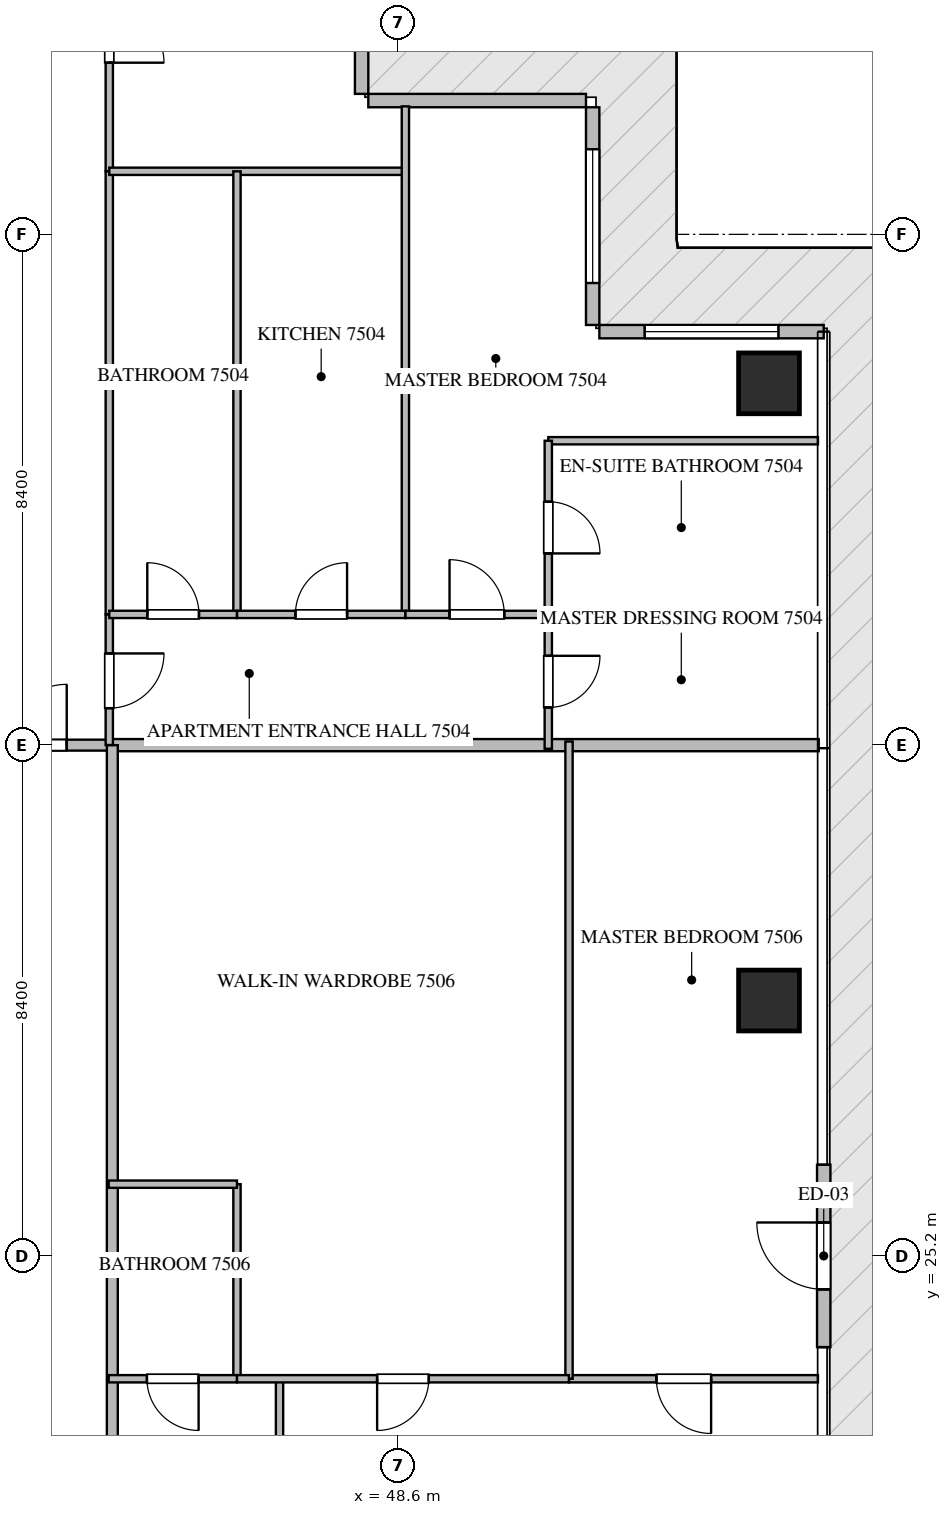
"""IFC4 building model, lengths in metres.
Left out: names, types, materials, properties, quantities, classifications, styles, units other than length and angle.
Written with IfcOpenShell. Run it as: python <this file> out.ifc"""

import sys

from ifc_helpers import new_model, si_unit, direction, frame, frame_2d, origin, origin_2d, place, context, subcontext, project, spatial, rectangle, extrude, source, transform, mapped, element, fill, save


model = new_model("IFC4")
c1 = context("Model", 3, precision=1e-05, world=origin(), true_north=direction((0.0, 1.0)))
c2 = subcontext(c1, "Body", "Model", "MODEL_VIEW")
j1 = project(units=[si_unit("LENGTHUNIT", "METRE"), si_unit("PLANEANGLEUNIT", "RADIAN")], contexts=[c1])
p1 = place(None, origin())
s1 = spatial("IfcSite", under=j1, at=p1, CompositionType="ELEMENT")
p2 = place(p1, origin())
s2 = spatial("IfcBuilding", under=s1, at=p2, CompositionType="ELEMENT")
p3 = place(p2, frame((0.0, 0.0, 301.55)))
s3 = spatial("IfcBuildingStorey", under=s2, at=p3, CompositionType="ELEMENT", Elevation=301.55)
m1 = source(origin(), c2, "Body", "SweptSolid", [
    extrude(rectangle(XDim=1.0, YDim=1.0, at=origin_2d()), origin(), (0.0, 0.0, 1.0), 4.05),
])
for number, where, z_axis, x_axis in (
    (1, (54.7, 29.4, -0.26), (0.0, 0.0, 1.0), (1.0, 0.0, 0.0)),
    (2, (54.7, 39.55, -0.26), (0.0, 0.0, 1.0), (1.0, 0.0, 0.0)),
):
    element("IfcColumn", number, at=place(p3, frame(where, z_axis=z_axis, x_axis=x_axis)), inside=s3, PredefinedType="COLUMN", context=c2, shape_type="MappedRepresentation", body=[
        mapped(m1, transform((0.0, 0.0, 0.0), scale=1.0)),
    ])
p4 = place(p3, frame((55.6, 23.7, 0.0), z_axis=(0.0, 0.0, 1.0), x_axis=(0.0, 1.0, 0.0)))
e3 = element("IfcWall", 3, at=p4, inside=s3, PredefinedType="ELEMENTEDWALL", context=c2, shape_type="SweptSolid", body=[
    extrude(rectangle(XDim=3.0, YDim=0.22, at=frame_2d((1.5, 0.0))), origin(), (0.0, 0.0, 1.0), 3.775),
])
p5 = place(p4, frame((0.95, 0.0, 0.0)))
e4 = element("IfcOpeningElement", 4, at=p5, cuts=e3, PredefinedType="OPENING", context=c2, shape_type="SweptSolid", body=[
    extrude(rectangle(XDim=1.1, YDim=2.2, at=frame_2d((0.55, 1.1))), frame((0.0, 0.12, 0.0), z_axis=(0.0, -1.0, 0.0), x_axis=(1.0, 0.0, 0.0)), (0.0, 0.0, 1.0), 0.24),
])
p6 = place(p3, frame((55.6, 40.4, 0.0), z_axis=(0.0, 0.0, 1.0), x_axis=(-1.0, 0.0, 0.0)))
e5 = element("IfcWall", 5, at=p6, inside=s3, PredefinedType="ELEMENTEDWALL", context=c2, shape_type="SweptSolid", body=[
    extrude(rectangle(XDim=3.69, YDim=0.22, at=frame_2d((1.845, 0.0))), origin(), (0.0, 0.0, 1.0), 3.775),
])
p7 = place(p6, frame((0.745, 0.0, 0.65)))
e6 = element("IfcOpeningElement", 6, at=p7, cuts=e5, PredefinedType="OPENING", context=c2, shape_type="SweptSolid", body=[
    extrude(rectangle(XDim=2.2, YDim=2.4, at=frame_2d((1.1, 1.2))), frame((0.0, 0.12, 0.0), z_axis=(0.0, -1.0, 0.0), x_axis=(1.0, 0.0, 0.0)), (0.0, 0.0, 1.0), 0.24),
])
p8 = place(p3, frame((51.8, 40.51, 0.0), z_axis=(0.0, 0.0, 1.0), x_axis=(0.0, 1.0, 0.0)))
e7 = element("IfcWall", 7, at=p8, inside=s3, PredefinedType="ELEMENTEDWALL", context=c2, shape_type="SweptSolid", body=[
    extrude(rectangle(XDim=3.58, YDim=0.22, at=frame_2d((1.79, 0.0))), origin(), (0.0, 0.0, 1.0), 3.775),
])
p9 = place(p8, frame((0.69, 0.0, 0.65)))
e8 = element("IfcOpeningElement", 8, at=p9, cuts=e7, PredefinedType="OPENING", context=c2, shape_type="SweptSolid", body=[
    extrude(rectangle(XDim=2.2, YDim=2.4, at=frame_2d((1.1, 1.2))), frame((0.0, 0.12, 0.0), z_axis=(0.0, -1.0, 0.0), x_axis=(1.0, 0.0, 0.0)), (0.0, 0.0, 1.0), 0.24),
])
p10 = place(p3, frame((51.69, 44.2, 0.0), z_axis=(0.0, 0.0, 1.0), x_axis=(-1.0, 0.0, 0.0)))
e9 = element("IfcWall", 9, at=p10, inside=s3, PredefinedType="ELEMENTEDWALL", context=c2, shape_type="SweptSolid", body=[
    extrude(rectangle(XDim=3.58, YDim=0.22, at=frame_2d((1.79, 0.0))), origin(), (0.0, 0.0, 1.0), 3.775),
])
p11 = place(p3, frame((48.0, 44.31, 0.0), z_axis=(0.0, 0.0, 1.0), x_axis=(0.0, 1.0, 0.0)))
e10 = element("IfcWall", 10, at=p11, inside=s3, PredefinedType="ELEMENTEDWALL", context=c2, shape_type="SweptSolid", body=[
    extrude(rectangle(XDim=3.69, YDim=0.22, at=frame_2d((1.845, 0.0))), origin(), (0.0, 0.0, 1.0), 3.775),
])
p12 = place(p11, frame((0.745, 0.0, 0.65)))
e11 = element("IfcOpeningElement", 11, at=p12, cuts=e10, PredefinedType="OPENING", context=c2, shape_type="SweptSolid", body=[
    extrude(rectangle(XDim=2.2, YDim=2.4, at=frame_2d((1.1, 1.2))), frame((0.0, 0.12, 0.0), z_axis=(0.0, -1.0, 0.0), x_axis=(1.0, 0.0, 0.0)), (0.0, 0.0, 1.0), 0.24),
])
p13 = place(p3, frame((43.9, 33.6, 0.0), z_axis=(0.0, 0.0, 1.0), x_axis=(1.0, 0.0, 0.0)))
e12 = element("IfcWall", 12, at=p13, inside=s3, PredefinedType="PARTITIONING", context=c2, shape_type="SweptSolid", body=[
    extrude(rectangle(XDim=11.618, YDim=0.2, at=frame_2d((5.809, 0.0))), origin(), (0.0, 0.0, 1.0), 3.79),
])
p14 = place(p3, frame((41.402, 33.6, 0.0), z_axis=(0.0, 0.0, 1.0), x_axis=(1.0, 0.0, 0.0)))
e13 = element("IfcWall", 13, at=p14, inside=s3, PredefinedType="PARTITIONING", context=c2, shape_type="SweptSolid", body=[
    extrude(rectangle(XDim=2.496, YDim=0.18, at=frame_2d((1.248, 0.0))), origin(), (0.0, 0.0, 1.0), 3.79),
])
p15 = place(p14, frame((0.748, 0.0, 0.0)))
e14 = element("IfcOpeningElement", 14, at=p15, cuts=e13, PredefinedType="OPENING", context=c2, shape_type="SweptSolid", body=[
    extrude(rectangle(XDim=1.0, YDim=2.15, at=frame_2d((0.5, 1.075))), frame((0.0, 0.1, 0.0), z_axis=(0.0, -1.0, 0.0), x_axis=(1.0, 0.0, 0.0)), (0.0, 0.0, 1.0), 0.2),
])
p16 = place(p3, frame((43.9, 16.8, 0.0), z_axis=(0.0, 0.0, 1.0), x_axis=(0.0, 1.0, 0.0)))
e15 = element("IfcWall", 15, at=p16, inside=s3, PredefinedType="PARTITIONING", context=c2, shape_type="SweptSolid", body=[
    extrude(rectangle(XDim=16.8, YDim=0.18, at=frame_2d((8.4, 0.0))), origin(), (0.0, 0.0, 1.0), 3.79),
])
p17 = place(p16, frame((1.3, 0.0, 0.0)))
e16 = element("IfcOpeningElement", 16, at=p17, cuts=e15, PredefinedType="OPENING", context=c2, shape_type="SweptSolid", body=[
    extrude(rectangle(XDim=1.0, YDim=2.15, at=frame_2d((0.5, 1.075))), frame((0.0, 0.1, 0.0), z_axis=(0.0, -1.0, 0.0), x_axis=(1.0, 0.0, 0.0)), (0.0, 0.0, 1.0), 0.2),
])
p18 = place(p3, frame((43.85, 35.75, 0.0), z_axis=(0.0, 0.0, 1.0), x_axis=(0.0, -1.0, 0.0)))
e17 = element("IfcWall", 17, at=p18, inside=s3, PredefinedType="PARTITIONING", context=c2, shape_type="SweptSolid", body=[
    extrude(rectangle(XDim=2.148, YDim=0.12, at=frame_2d((1.074, 0.0))), origin(), (0.0, 0.0, 1.0), 3.79),
])
p19 = place(p18, frame((0.642, 0.0, 0.0)))
e18 = element("IfcOpeningElement", 18, at=p19, cuts=e17, PredefinedType="OPENING", context=c2, shape_type="SweptSolid", body=[
    extrude(rectangle(XDim=0.9, YDim=2.1, at=frame_2d((0.45, 1.05))), frame((0.0, 0.07, 0.0), z_axis=(0.0, -1.0, 0.0), x_axis=(1.0, 0.0, 0.0)), (0.0, 0.0, 1.0), 0.14),
])
p20 = place(p3, frame((43.85, 47.905, 0.0), z_axis=(0.0, 0.0, 1.0), x_axis=(0.0, -1.0, 0.0)))
e19 = element("IfcWall", 19, at=p20, inside=s3, PredefinedType="PARTITIONING", context=c2, shape_type="SweptSolid", body=[
    extrude(rectangle(XDim=4.868, YDim=0.12, at=frame_2d((2.434, 0.0))), origin(), (0.0, 0.0, 1.0), 3.79),
])
p21 = place(p20, frame((2.182, 0.0, 0.0)))
e20 = element("IfcOpeningElement", 20, at=p21, cuts=e19, PredefinedType="OPENING", context=c2, shape_type="SweptSolid", body=[
    extrude(rectangle(XDim=0.9, YDim=2.1, at=frame_2d((0.45, 1.05))), frame((0.0, 0.07, 0.0), z_axis=(0.0, -1.0, 0.0), x_axis=(1.0, 0.0, 0.0)), (0.0, 0.0, 1.0), 0.14),
])
p22 = place(p3, frame((43.85, 43.035, 0.0), z_axis=(0.0, 0.0, 1.0), x_axis=(0.0, -1.0, 0.0)))
e21 = element("IfcWall", 21, at=p22, inside=s3, PredefinedType="PARTITIONING", context=c2, shape_type="SweptSolid", body=[
    extrude(rectangle(XDim=7.283, YDim=0.12, at=frame_2d((3.642, 0.0))), origin(), (0.0, 0.0, 1.0), 3.79),
])
p23 = place(p3, frame((43.85, 43.037, 0.0), z_axis=(0.0, 0.0, 1.0), x_axis=(1.0, 0.0, 0.0)))
e22 = element("IfcWall", 22, at=p23, inside=s3, PredefinedType="PARTITIONING", context=c2, shape_type="SweptSolid", body=[
    extrude(rectangle(XDim=4.87, YDim=0.12, at=frame_2d((2.435, 0.0))), origin(), (0.0, 0.0, 1.0), 3.79),
])
p24 = place(p3, frame((48.72, 44.105, 0.0), z_axis=(0.0, 0.0, 1.0), x_axis=(0.0, -1.0, 0.0)))
e23 = element("IfcWall", 23, at=p24, inside=s3, PredefinedType="PARTITIONING", context=c2, shape_type="SweptSolid", body=[
    extrude(rectangle(XDim=8.355, YDim=0.12, at=frame_2d((4.177, 0.0))), origin(), (0.0, 0.0, 1.0), 3.79),
])
p25 = place(p3, frame((45.95, 43.037, 0.0), z_axis=(0.0, 0.0, 1.0), x_axis=(0.0, -1.0, 0.0)))
e24 = element("IfcWall", 24, at=p25, inside=s3, PredefinedType="PARTITIONING", context=c2, shape_type="SweptSolid", body=[
    extrude(rectangle(XDim=7.287, YDim=0.12, at=frame_2d((3.644, 0.0))), origin(), (0.0, 0.0, 1.0), 3.79),
])
p26 = place(p3, frame((43.85, 35.75, 0.0), z_axis=(0.0, 0.0, 1.0), x_axis=(1.0, 0.0, 0.0)))
e25 = element("IfcWall", 25, at=p26, inside=s3, PredefinedType="PARTITIONING", context=c2, shape_type="SweptSolid", body=[
    extrude(rectangle(XDim=2.1, YDim=0.12, at=frame_2d((1.05, 0.0))), origin(), (0.0, 0.0, 1.0), 3.79),
])
p27 = place(p26, frame((0.625, 0.0, 0.0)))
e26 = element("IfcOpeningElement", 26, at=p27, cuts=e25, PredefinedType="OPENING", context=c2, shape_type="SweptSolid", body=[
    extrude(rectangle(XDim=0.85, YDim=2.1, at=frame_2d((0.425, 1.05))), frame((0.0, 0.07, 0.0), z_axis=(0.0, -1.0, 0.0), x_axis=(1.0, 0.0, 0.0)), (0.0, 0.0, 1.0), 0.14),
])
p28 = place(p3, frame((45.952, 35.75, 0.0), z_axis=(0.0, 0.0, 1.0), x_axis=(1.0, 0.0, 0.0)))
e27 = element("IfcWall", 27, at=p28, inside=s3, PredefinedType="PARTITIONING", context=c2, shape_type="SweptSolid", body=[
    extrude(rectangle(XDim=2.768, YDim=0.12, at=frame_2d((1.384, 0.0))), origin(), (0.0, 0.0, 1.0), 3.79),
])
p29 = place(p28, frame((0.959, 0.0, 0.0)))
e28 = element("IfcOpeningElement", 28, at=p29, cuts=e27, PredefinedType="OPENING", context=c2, shape_type="SweptSolid", body=[
    extrude(rectangle(XDim=0.85, YDim=2.1, at=frame_2d((0.425, 1.05))), frame((0.0, 0.07, 0.0), z_axis=(0.0, -1.0, 0.0), x_axis=(1.0, 0.0, 0.0)), (0.0, 0.0, 1.0), 0.14),
])
p30 = place(p3, frame((48.722, 35.75, 0.0), z_axis=(0.0, 0.0, 1.0), x_axis=(1.0, 0.0, 0.0)))
e29 = element("IfcWall", 29, at=p30, inside=s3, PredefinedType="PARTITIONING", context=c2, shape_type="SweptSolid", body=[
    extrude(rectangle(XDim=2.348, YDim=0.12, at=frame_2d((1.174, 0.0))), origin(), (0.0, 0.0, 1.0), 3.79),
])
p31 = place(p30, frame((0.724, 0.0, 0.0)))
e30 = element("IfcOpeningElement", 30, at=p31, cuts=e29, PredefinedType="OPENING", context=c2, shape_type="SweptSolid", body=[
    extrude(rectangle(XDim=0.9, YDim=2.1, at=frame_2d((0.45, 1.05))), frame((0.0, 0.07, 0.0), z_axis=(0.0, -1.0, 0.0), x_axis=(1.0, 0.0, 0.0)), (0.0, 0.0, 1.0), 0.14),
])
p32 = place(p3, frame((51.07, 38.606, 0.0), z_axis=(0.0, 0.0, 1.0), x_axis=(1.0, 0.0, 0.0)))
e31 = element("IfcWall", 31, at=p32, inside=s3, PredefinedType="PARTITIONING", context=c2, shape_type="SweptSolid", body=[
    extrude(rectangle(XDim=4.435, YDim=0.12, at=frame_2d((2.217, 0.0))), origin(), (0.0, 0.0, 1.0), 3.79),
])
p33 = place(p3, frame((51.072, 35.75, 0.0), z_axis=(0.0, 0.0, 1.0), x_axis=(1.0, 0.0, 0.0)))
e32 = element("IfcWall", 32, at=p33, inside=s3, PredefinedType="PARTITIONING", context=c2, shape_type="SweptSolid", body=[
    extrude(rectangle(XDim=4.433, YDim=0.12, at=frame_2d((2.216, 0.0))), origin(), (0.0, 0.0, 1.0), 3.79),
])
p34 = place(p3, frame((51.07, 38.606, 0.0), z_axis=(0.0, 0.0, 1.0), x_axis=(0.0, -1.0, 0.0)))
e33 = element("IfcWall", 33, at=p34, inside=s3, PredefinedType="PARTITIONING", context=c2, shape_type="SweptSolid", body=[
    extrude(rectangle(XDim=2.856, YDim=0.12, at=frame_2d((1.428, 0.0))), origin(), (0.0, 0.0, 1.0), 3.79),
])
p35 = place(p34, frame((1.003, 0.0, 0.0)))
e34 = element("IfcOpeningElement", 34, at=p35, cuts=e33, PredefinedType="OPENING", context=c2, shape_type="SweptSolid", body=[
    extrude(rectangle(XDim=0.85, YDim=2.1, at=frame_2d((0.425, 1.05))), frame((0.0, 0.07, 0.0), z_axis=(0.0, -1.0, 0.0), x_axis=(1.0, 0.0, 0.0)), (0.0, 0.0, 1.0), 0.14),
])
p36 = place(p3, frame((51.07, 35.748, 0.0), z_axis=(0.0, 0.0, 1.0), x_axis=(0.0, -1.0, 0.0)))
e35 = element("IfcWall", 35, at=p36, inside=s3, PredefinedType="PARTITIONING", context=c2, shape_type="SweptSolid", body=[
    extrude(rectangle(XDim=2.208, YDim=0.12, at=frame_2d((1.104, 0.0))), origin(), (0.0, 0.0, 1.0), 3.79),
])
p37 = place(p36, frame((0.679, 0.0, 0.0)))
e36 = element("IfcOpeningElement", 36, at=p37, cuts=e35, PredefinedType="OPENING", context=c2, shape_type="SweptSolid", body=[
    extrude(rectangle(XDim=0.85, YDim=2.1, at=frame_2d((0.425, 1.05))), frame((0.0, 0.07, 0.0), z_axis=(0.0, -1.0, 0.0), x_axis=(1.0, 0.0, 0.0)), (0.0, 0.0, 1.0), 0.14),
])
p38 = place(p3, frame((46.65, 19.4, 0.0), z_axis=(0.0, 0.0, 1.0), x_axis=(0.0, 1.0, 0.0)))
e37 = element("IfcWall", 37, at=p38, inside=s3, PredefinedType="PARTITIONING", context=c2, shape_type="SweptSolid", body=[
    extrude(rectangle(XDim=3.78, YDim=0.12, at=frame_2d((1.89, 0.0))), origin(), (0.0, 0.0, 1.0), 3.79),
])
p39 = place(p38, frame((1.465, 0.0, 0.0)))
e38 = element("IfcOpeningElement", 38, at=p39, cuts=e37, PredefinedType="OPENING", context=c2, shape_type="SweptSolid", body=[
    extrude(rectangle(XDim=0.85, YDim=2.1, at=frame_2d((0.425, 1.05))), frame((0.0, 0.07, 0.0), z_axis=(0.0, -1.0, 0.0), x_axis=(1.0, 0.0, 0.0)), (0.0, 0.0, 1.0), 0.14),
])
p40 = place(p3, frame((55.505, 23.18, 0.0), z_axis=(0.0, 0.0, 1.0), x_axis=(-1.0, 0.0, 0.0)))
e39 = element("IfcWall", 39, at=p40, inside=s3, PredefinedType="PARTITIONING", context=c2, shape_type="SweptSolid", body=[
    extrude(rectangle(XDim=4.094, YDim=0.12, at=frame_2d((2.047, 0.0))), origin(), (0.0, 0.0, 1.0), 3.79),
])
p41 = place(p40, frame((1.757, 0.0, 0.0)))
e40 = element("IfcOpeningElement", 40, at=p41, cuts=e39, PredefinedType="OPENING", context=c2, shape_type="SweptSolid", body=[
    extrude(rectangle(XDim=0.9, YDim=2.1, at=frame_2d((0.45, 1.05))), frame((0.0, 0.07, 0.0), z_axis=(0.0, -1.0, 0.0), x_axis=(1.0, 0.0, 0.0)), (0.0, 0.0, 1.0), 0.14),
])
p42 = place(p3, frame((51.411, 23.18, 0.0), z_axis=(0.0, 0.0, 1.0), x_axis=(0.0, 1.0, 0.0)))
e41 = element("IfcWall", 41, at=p42, inside=s3, PredefinedType="PARTITIONING", context=c2, shape_type="SweptSolid", body=[
    extrude(rectangle(XDim=10.48, YDim=0.12, at=frame_2d((5.24, 0.0))), origin(), (0.0, 0.0, 1.0), 3.79),
])
p43 = place(p3, frame((45.95, 23.18, 0.0), z_axis=(0.0, 0.0, 1.0), x_axis=(0.0, 1.0, 0.0)))
e42 = element("IfcWall", 42, at=p43, inside=s3, PredefinedType="PARTITIONING", context=c2, shape_type="SweptSolid", body=[
    extrude(rectangle(XDim=3.2, YDim=0.12, at=frame_2d((1.6, 0.0))), origin(), (0.0, 0.0, 1.0), 3.79),
])
p44 = place(p3, frame((45.95, 26.38, 0.0), z_axis=(0.0, 0.0, 1.0), x_axis=(-1.0, 0.0, 0.0)))
e43 = element("IfcWall", 43, at=p44, inside=s3, PredefinedType="PARTITIONING", context=c2, shape_type="SweptSolid", body=[
    extrude(rectangle(XDim=2.11, YDim=0.12, at=frame_2d((1.055, 0.0))), origin(), (0.0, 0.0, 1.0), 3.79),
])
p45 = place(p3, frame((51.409, 23.18, 0.0), z_axis=(0.0, 0.0, 1.0), x_axis=(-1.0, 0.0, 0.0)))
e44 = element("IfcWall", 44, at=p45, inside=s3, PredefinedType="PARTITIONING", context=c2, shape_type="SweptSolid", body=[
    extrude(rectangle(XDim=5.459, YDim=0.12, at=frame_2d((2.729, 0.0))), origin(), (0.0, 0.0, 1.0), 3.79),
])
p46 = place(p45, frame((2.304, 0.0, 0.0)))
e45 = element("IfcOpeningElement", 45, at=p46, cuts=e44, PredefinedType="OPENING", context=c2, shape_type="SweptSolid", body=[
    extrude(rectangle(XDim=0.85, YDim=2.1, at=frame_2d((0.425, 1.05))), frame((0.0, 0.07, 0.0), z_axis=(0.0, -1.0, 0.0), x_axis=(1.0, 0.0, 0.0)), (0.0, 0.0, 1.0), 0.14),
])
p47 = place(p3, frame((45.948, 23.18, 0.0), z_axis=(0.0, 0.0, 1.0), x_axis=(-1.0, 0.0, 0.0)))
e46 = element("IfcWall", 46, at=p47, inside=s3, PredefinedType="PARTITIONING", context=c2, shape_type="SweptSolid", body=[
    extrude(rectangle(XDim=2.108, YDim=0.12, at=frame_2d((1.054, 0.0))), origin(), (0.0, 0.0, 1.0), 3.79),
])
p48 = place(p47, frame((0.629, 0.0, 0.0)))
e47 = element("IfcOpeningElement", 47, at=p48, cuts=e46, PredefinedType="OPENING", context=c2, shape_type="SweptSolid", body=[
    extrude(rectangle(XDim=0.85, YDim=2.1, at=frame_2d((0.425, 1.05))), frame((0.0, 0.07, 0.0), z_axis=(0.0, -1.0, 0.0), x_axis=(1.0, 0.0, 0.0)), (0.0, 0.0, 1.0), 0.14),
])
m2 = source(origin(), c2, "Body", "SweptSolid", [
    extrude(rectangle(XDim=1.1, YDim=2.2, at=frame_2d((0.55, 1.1))), frame((0.0, 0.025, 0.0), z_axis=(0.0, -1.0, 0.0), x_axis=(1.0, 0.0, 0.0)), (0.0, 0.0, 1.0), 0.05),
])
p49 = place(p5, origin())
e48 = element("IfcDoor", 48, at=p49, inside=s3, OperationType="SINGLE_SWING_RIGHT", PredefinedType="DOOR", context=c2, shape_type="MappedRepresentation", body=[
    mapped(m2, transform((0.0, 0.0, 0.0), scale=1.0)),
])
fill(e4, e48)
m3 = source(origin(), c2, "Body", "SweptSolid", [
    extrude(rectangle(XDim=2.2, YDim=2.4, at=frame_2d((1.1, 1.2))), frame((0.0, 0.03, 0.0), z_axis=(0.0, -1.0, 0.0), x_axis=(1.0, 0.0, 0.0)), (0.0, 0.0, 1.0), 0.06),
])
p50 = place(p7, origin())
e49 = element("IfcWindow", 49, at=p50, inside=s3, PartitioningType="SINGLE_PANEL", PredefinedType="WINDOW", context=c2, shape_type="MappedRepresentation", body=[
    mapped(m3, transform((0.0, 0.0, 0.0), scale=1.0)),
])
fill(e6, e49)
p51 = place(p9, origin())
e50 = element("IfcWindow", 50, at=p51, inside=s3, PartitioningType="SINGLE_PANEL", PredefinedType="WINDOW", context=c2, shape_type="MappedRepresentation", body=[
    mapped(m3, transform((0.0, 0.0, 0.0), scale=1.0)),
])
fill(e8, e50)
m4 = source(origin(), c2, "Body", "SweptSolid", [
    extrude(rectangle(XDim=1.0, YDim=2.15, at=frame_2d((0.5, 1.075))), frame((0.0, 0.025, 0.0), z_axis=(0.0, -1.0, 0.0), x_axis=(1.0, 0.0, 0.0)), (0.0, 0.0, 1.0), 0.05),
])
p52 = place(p15, origin())
e51 = element("IfcDoor", 51, at=p52, inside=s3, OperationType="SINGLE_SWING_RIGHT", PredefinedType="DOOR", context=c2, shape_type="MappedRepresentation", body=[
    mapped(m4, transform((0.0, 0.0, 0.0), scale=1.0)),
])
fill(e14, e51)
m5 = source(origin(), c2, "Body", "SweptSolid", [
    extrude(rectangle(XDim=0.9, YDim=2.1, at=frame_2d((0.45, 1.05))), frame((0.0, 0.025, 0.0), z_axis=(0.0, -1.0, 0.0), x_axis=(1.0, 0.0, 0.0)), (0.0, 0.0, 1.0), 0.05),
])
p53 = place(p19, origin())
e52 = element("IfcDoor", 52, at=p53, inside=s3, OperationType="SINGLE_SWING_LEFT", PredefinedType="DOOR", context=c2, shape_type="MappedRepresentation", body=[
    mapped(m5, transform((0.0, 0.0, 0.0), scale=1.0)),
])
fill(e18, e52)
p54 = place(p21, origin())
e53 = element("IfcDoor", 53, at=p54, inside=s3, OperationType="SINGLE_SWING_RIGHT", PredefinedType="DOOR", context=c2, shape_type="MappedRepresentation", body=[
    mapped(m5, transform((0.0, 0.0, 0.0), scale=1.0)),
])
fill(e20, e53)
m6 = source(origin(), c2, "Body", "SweptSolid", [
    extrude(rectangle(XDim=0.85, YDim=2.1, at=frame_2d((0.425, 1.05))), frame((0.0, 0.025, 0.0), z_axis=(0.0, -1.0, 0.0), x_axis=(1.0, 0.0, 0.0)), (0.0, 0.0, 1.0), 0.05),
])
p55 = place(p27, origin())
e54 = element("IfcDoor", 54, at=p55, inside=s3, OperationType="SINGLE_SWING_LEFT", PredefinedType="DOOR", context=c2, shape_type="MappedRepresentation", body=[
    mapped(m6, transform((0.0, 0.0, 0.0), scale=1.0)),
])
fill(e26, e54)
p56 = place(p29, origin())
e55 = element("IfcDoor", 55, at=p56, inside=s3, OperationType="SINGLE_SWING_RIGHT", PredefinedType="DOOR", context=c2, shape_type="MappedRepresentation", body=[
    mapped(m6, transform((0.0, 0.0, 0.0), scale=1.0)),
])
fill(e28, e55)
p57 = place(p31, origin())
e56 = element("IfcDoor", 56, at=p57, inside=s3, OperationType="SINGLE_SWING_LEFT", PredefinedType="DOOR", context=c2, shape_type="MappedRepresentation", body=[
    mapped(m5, transform((0.0, 0.0, 0.0), scale=1.0)),
])
fill(e30, e56)
p58 = place(p35, origin())
e57 = element("IfcDoor", 57, at=p58, inside=s3, OperationType="SINGLE_SWING_RIGHT", PredefinedType="DOOR", context=c2, shape_type="MappedRepresentation", body=[
    mapped(m6, transform((0.0, 0.0, 0.0), scale=1.0)),
])
fill(e34, e57)
p59 = place(p37, origin())
e58 = element("IfcDoor", 58, at=p59, inside=s3, OperationType="SINGLE_SWING_LEFT", PredefinedType="DOOR", context=c2, shape_type="MappedRepresentation", body=[
    mapped(m6, transform((0.0, 0.0, 0.0), scale=1.0)),
])
fill(e36, e58)
p60 = place(p41, origin())
e59 = element("IfcDoor", 59, at=p60, inside=s3, OperationType="SINGLE_SWING_LEFT", PredefinedType="DOOR", context=c2, shape_type="MappedRepresentation", body=[
    mapped(m5, transform((0.0, 0.0, 0.0), scale=1.0)),
])
fill(e40, e59)
p61 = place(p46, origin())
e60 = element("IfcDoor", 60, at=p61, inside=s3, OperationType="SINGLE_SWING_RIGHT", PredefinedType="DOOR", context=c2, shape_type="MappedRepresentation", body=[
    mapped(m6, transform((0.0, 0.0, 0.0), scale=1.0)),
])
fill(e45, e60)
p62 = place(p48, origin())
e61 = element("IfcDoor", 61, at=p62, inside=s3, OperationType="SINGLE_SWING_LEFT", PredefinedType="DOOR", context=c2, shape_type="MappedRepresentation", body=[
    mapped(m6, transform((0.0, 0.0, 0.0), scale=1.0)),
])
fill(e47, e61)
save(model, sys.argv[1])
